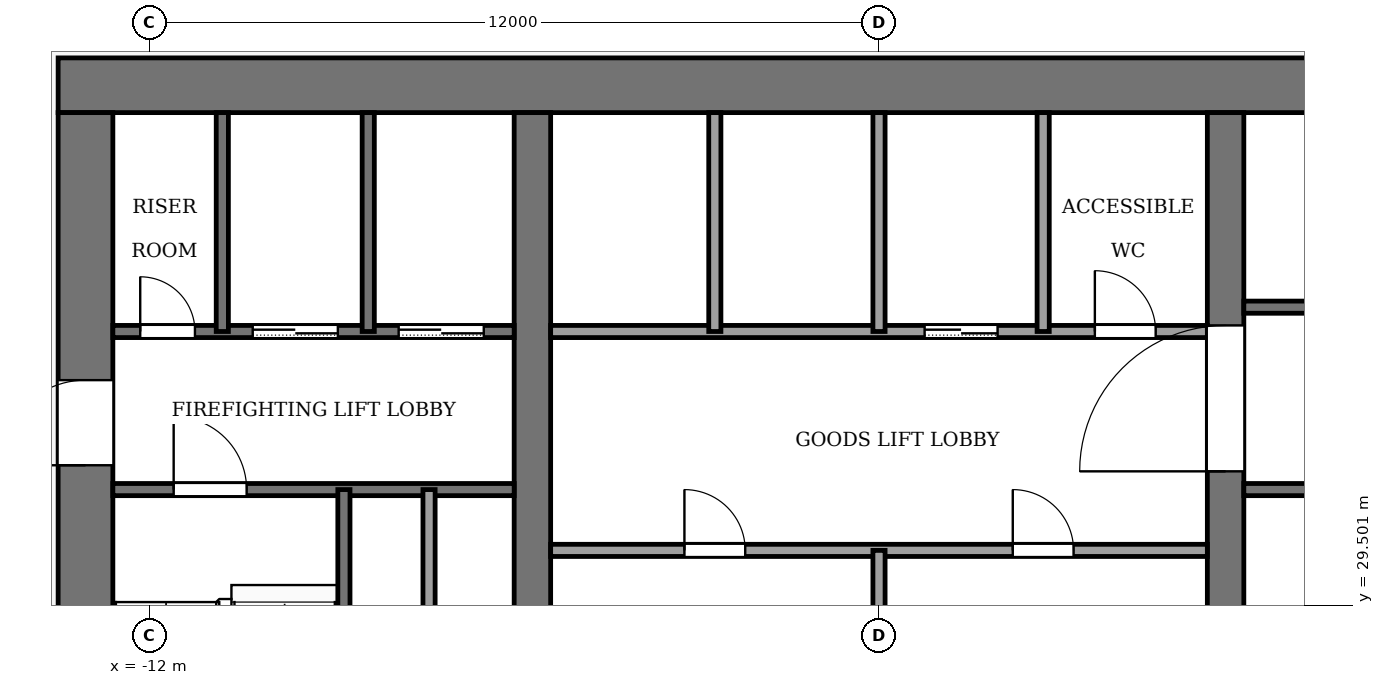
"""IFC4 building model, lengths in metres.
Left out: names, types, materials, properties, quantities, classifications, styles, units other than length and angle.
Written with IfcOpenShell. Run it as: python <this file> out.ifc"""

import sys

from ifc_helpers import new_model, si_unit, direction, frame, frame_2d, origin, place, context, subcontext, project, spatial, rectangle, extrude, element, fill, save


model = new_model("IFC4")
c1 = context("Model", 3, precision=1e-05, world=origin(), true_north=direction((0.0, 1.0)))
c2 = subcontext(c1, "Body", "Model", "MODEL_VIEW")
j1 = project(units=[si_unit("LENGTHUNIT", "METRE"), si_unit("PLANEANGLEUNIT", "RADIAN")], contexts=[c1])
p1 = place(None, origin())
s1 = spatial("IfcSite", under=j1, at=p1, CompositionType="ELEMENT")
p2 = place(p1, origin())
s2 = spatial("IfcBuilding", under=s1, at=p2, CompositionType="ELEMENT")
p3 = place(p2, frame((0.0, 0.0, 218.0)))
s3 = spatial("IfcBuildingStorey", under=s2, at=p3, CompositionType="ELEMENT", Elevation=218.0)
p4 = place(p3, frame((-13.5, 38.05, -0.13), z_axis=(0.0, 0.0, 1.0), x_axis=(1.0, 0.0, 0.0)))
e1 = element("IfcWall", 1, at=p4, inside=s3, PredefinedType="SHEAR", context=c2, shape_type="SweptSolid", body=[
    extrude(rectangle(XDim=27.0, YDim=0.9, at=frame_2d((13.5, 0.0))), origin(), (0.0, 0.0, 1.0), 4.0),
])
p5 = place(p3, frame((-13.05, 18.4, -0.13), z_axis=(0.0, 0.0, 1.0), x_axis=(0.0, 1.0, 0.0)))
e2 = element("IfcWall", 2, at=p5, inside=s3, PredefinedType="SHEAR", context=c2, shape_type="SweptSolid", body=[
    extrude(rectangle(XDim=19.2, YDim=0.9, at=frame_2d((9.6, 0.0))), origin(), (0.0, 0.0, 1.0), 4.0),
])
p6 = place(p5, frame((2.8, 0.0, 0.13)))
e3 = element("IfcOpeningElement", 3, at=p6, cuts=e2, PredefinedType="OPENING", context=c2, shape_type="SweptSolid", body=[
    extrude(rectangle(XDim=2.4, YDim=2.4, at=frame_2d((1.2, 1.2))), frame((0.0, 0.46, 0.0), z_axis=(0.0, -1.0, 0.0), x_axis=(1.0, 0.0, 0.0)), (0.0, 0.0, 1.0), 0.92),
])
p7 = place(p5, frame((13.4, 0.0, 0.13)))
e4 = element("IfcOpeningElement", 4, at=p7, cuts=e2, PredefinedType="OPENING", context=c2, shape_type="SweptSolid", body=[
    extrude(rectangle(XDim=1.4, YDim=2.2, at=frame_2d((0.7, 1.1))), frame((0.0, 0.46, 0.0), z_axis=(0.0, -1.0, 0.0), x_axis=(1.0, 0.0, 0.0)), (0.0, 0.0, 1.0), 0.92),
])
p8 = place(p3, frame((-5.7, 18.4, -0.13), z_axis=(0.0, 0.0, 1.0), x_axis=(0.0, 1.0, 0.0)))
e5 = element("IfcWall", 5, at=p8, inside=s3, PredefinedType="SHEAR", context=c2, shape_type="SweptSolid", body=[
    extrude(rectangle(XDim=19.2, YDim=0.6, at=frame_2d((9.6, 0.0))), origin(), (0.0, 0.0, 1.0), 4.0),
])
p9 = place(p8, frame((8.35, 0.0, 0.13)))
e6 = element("IfcOpeningElement", 6, at=p9, cuts=e5, PredefinedType="OPENING", context=c2, shape_type="SweptSolid", body=[
    extrude(rectangle(XDim=0.9, YDim=2.1, at=frame_2d((0.45, 1.05))), frame((0.0, 0.31, 0.0), z_axis=(0.0, -1.0, 0.0), x_axis=(1.0, 0.0, 0.0)), (0.0, 0.0, 1.0), 0.62),
])
p10 = place(p3, frame((5.7, 18.4, -0.13), z_axis=(0.0, 0.0, 1.0), x_axis=(0.0, 1.0, 0.0)))
e7 = element("IfcWall", 7, at=p10, inside=s3, PredefinedType="SHEAR", context=c2, shape_type="SweptSolid", body=[
    extrude(rectangle(XDim=19.2, YDim=0.6, at=frame_2d((9.6, 0.0))), origin(), (0.0, 0.0, 1.0), 4.0),
])
p11 = place(p10, frame((8.35, 0.0, 0.13)))
e8 = element("IfcOpeningElement", 8, at=p11, cuts=e7, PredefinedType="OPENING", context=c2, shape_type="SweptSolid", body=[
    extrude(rectangle(XDim=0.9, YDim=2.1, at=frame_2d((0.45, 1.05))), frame((0.0, 0.31, 0.0), z_axis=(0.0, -1.0, 0.0), x_axis=(1.0, 0.0, 0.0)), (0.0, 0.0, 1.0), 0.62),
])
p12 = place(p10, frame((13.3, 0.0, 0.13)))
e9 = element("IfcOpeningElement", 9, at=p12, cuts=e7, PredefinedType="OPENING", context=c2, shape_type="SweptSolid", body=[
    extrude(rectangle(XDim=2.4, YDim=2.4, at=frame_2d((1.2, 1.2))), frame((0.0, 0.31, 0.0), z_axis=(0.0, -1.0, 0.0), x_axis=(1.0, 0.0, 0.0)), (0.0, 0.0, 1.0), 0.62),
])
p13 = place(p3, frame((-5.4, 30.4, 0.0), z_axis=(0.0, 0.0, 1.0), x_axis=(1.0, 0.0, 0.0)))
e10 = element("IfcWall", 10, at=p13, inside=s3, PredefinedType="PARTITIONING", context=c2, shape_type="SweptSolid", body=[
    extrude(rectangle(XDim=10.8, YDim=0.2, at=frame_2d((5.4, 0.0))), origin(), (0.0, 0.0, 1.0), 3.87),
])
p14 = place(p13, frame((2.2, 0.0, 0.0)))
e11 = element("IfcOpeningElement", 11, at=p14, cuts=e10, PredefinedType="OPENING", context=c2, shape_type="SweptSolid", body=[
    extrude(rectangle(XDim=1.0, YDim=2.1, at=frame_2d((0.5, 1.05))), frame((0.0, 0.11, 0.0), z_axis=(0.0, -1.0, 0.0), x_axis=(1.0, 0.0, 0.0)), (0.0, 0.0, 1.0), 0.22),
])
p15 = place(p13, frame((7.6, 0.0, 0.0)))
e12 = element("IfcOpeningElement", 12, at=p15, cuts=e10, PredefinedType="OPENING", context=c2, shape_type="SweptSolid", body=[
    extrude(rectangle(XDim=1.0, YDim=2.1, at=frame_2d((0.5, 1.05))), frame((0.0, 0.11, 0.0), z_axis=(0.0, -1.0, 0.0), x_axis=(1.0, 0.0, 0.0)), (0.0, 0.0, 1.0), 0.22),
])
p16 = place(p3, frame((-12.6, 31.4, 0.0), z_axis=(0.0, 0.0, 1.0), x_axis=(1.0, 0.0, 0.0)))
e13 = element("IfcWall", 13, at=p16, inside=s3, PredefinedType="PARTITIONING", context=c2, shape_type="SweptSolid", body=[
    extrude(rectangle(XDim=6.6, YDim=0.2, at=frame_2d((3.3, 0.0))), origin(), (0.0, 0.0, 1.0), 3.87),
])
p17 = place(p16, frame((1.0, 0.0, 0.0)))
e14 = element("IfcOpeningElement", 14, at=p17, cuts=e13, PredefinedType="OPENING", context=c2, shape_type="SweptSolid", body=[
    extrude(rectangle(XDim=1.2, YDim=2.2, at=frame_2d((0.6, 1.1))), frame((0.0, 0.11, 0.0), z_axis=(0.0, -1.0, 0.0), x_axis=(1.0, 0.0, 0.0)), (0.0, 0.0, 1.0), 0.22),
])
p18 = place(p3, frame((6.0, 31.4, 0.0), z_axis=(0.0, 0.0, 1.0), x_axis=(1.0, 0.0, 0.0)))
e15 = element("IfcWall", 15, at=p18, inside=s3, PredefinedType="PARTITIONING", context=c2, shape_type="SweptSolid", body=[
    extrude(rectangle(XDim=6.6, YDim=0.2, at=frame_2d((3.3, 0.0))), origin(), (0.0, 0.0, 1.0), 3.87),
])
p19 = place(p3, frame((-12.6, 34.0, 0.0), z_axis=(0.0, 0.0, 1.0), x_axis=(1.0, 0.0, 0.0)))
e16 = element("IfcWall", 16, at=p19, inside=s3, PredefinedType="PARTITIONING", context=c2, shape_type="SweptSolid", body=[
    extrude(rectangle(XDim=6.6, YDim=0.2, at=frame_2d((3.3, 0.0))), origin(), (0.0, 0.0, 1.0), 3.87),
])
p20 = place(p19, frame((4.7, 0.0, 0.0)))
e17 = element("IfcOpeningElement", 17, at=p20, cuts=e16, PredefinedType="OPENING", context=c2, shape_type="SweptSolid", body=[
    extrude(rectangle(XDim=1.4, YDim=2.2, at=frame_2d((0.7, 1.1))), frame((0.0, 0.11, 0.0), z_axis=(0.0, -1.0, 0.0), x_axis=(1.0, 0.0, 0.0)), (0.0, 0.0, 1.0), 0.22),
])
p21 = place(p19, frame((2.3, 0.0, 0.0)))
e18 = element("IfcOpeningElement", 18, at=p21, cuts=e16, PredefinedType="OPENING", context=c2, shape_type="SweptSolid", body=[
    extrude(rectangle(XDim=1.4, YDim=2.2, at=frame_2d((0.7, 1.1))), frame((0.0, 0.11, 0.0), z_axis=(0.0, -1.0, 0.0), x_axis=(1.0, 0.0, 0.0)), (0.0, 0.0, 1.0), 0.22),
])
p22 = place(p19, frame((0.45, 0.0, 0.0)))
e19 = element("IfcOpeningElement", 19, at=p22, cuts=e16, PredefinedType="OPENING", context=c2, shape_type="SweptSolid", body=[
    extrude(rectangle(XDim=0.9, YDim=2.1, at=frame_2d((0.45, 1.05))), frame((0.0, 0.11, 0.0), z_axis=(0.0, -1.0, 0.0), x_axis=(1.0, 0.0, 0.0)), (0.0, 0.0, 1.0), 0.22),
])
p23 = place(p3, frame((-5.4, 34.0, 0.0), z_axis=(0.0, 0.0, 1.0), x_axis=(1.0, 0.0, 0.0)))
e20 = element("IfcWall", 20, at=p23, inside=s3, PredefinedType="PARTITIONING", context=c2, shape_type="SweptSolid", body=[
    extrude(rectangle(XDim=10.8, YDim=0.2, at=frame_2d((5.4, 0.0))), origin(), (0.0, 0.0, 1.0), 3.87),
])
p24 = place(p23, frame((6.15, 0.0, 0.0)))
e21 = element("IfcOpeningElement", 21, at=p24, cuts=e20, PredefinedType="OPENING", context=c2, shape_type="SweptSolid", body=[
    extrude(rectangle(XDim=1.2, YDim=2.2, at=frame_2d((0.6, 1.1))), frame((0.0, 0.11, 0.0), z_axis=(0.0, -1.0, 0.0), x_axis=(1.0, 0.0, 0.0)), (0.0, 0.0, 1.0), 0.22),
])
p25 = place(p23, frame((8.95, 0.0, 0.0)))
e22 = element("IfcOpeningElement", 22, at=p25, cuts=e20, PredefinedType="OPENING", context=c2, shape_type="SweptSolid", body=[
    extrude(rectangle(XDim=1.0, YDim=2.1, at=frame_2d((0.5, 1.05))), frame((0.0, 0.11, 0.0), z_axis=(0.0, -1.0, 0.0), x_axis=(1.0, 0.0, 0.0)), (0.0, 0.0, 1.0), 0.22),
])
p26 = place(p3, frame((6.0, 34.4, 0.0), z_axis=(0.0, 0.0, 1.0), x_axis=(1.0, 0.0, 0.0)))
e23 = element("IfcWall", 23, at=p26, inside=s3, PredefinedType="PARTITIONING", context=c2, shape_type="SweptSolid", body=[
    extrude(rectangle(XDim=6.6, YDim=0.2, at=frame_2d((3.3, 0.0))), origin(), (0.0, 0.0, 1.0), 3.87),
])
p27 = place(p26, frame((4.8, 0.0, 0.0)))
e24 = element("IfcOpeningElement", 24, at=p27, cuts=e23, PredefinedType="OPENING", context=c2, shape_type="SweptSolid", body=[
    extrude(rectangle(XDim=1.2, YDim=2.2, at=frame_2d((0.6, 1.1))), frame((0.0, 0.11, 0.0), z_axis=(0.0, -1.0, 0.0), x_axis=(1.0, 0.0, 0.0)), (0.0, 0.0, 1.0), 0.22),
])
p28 = place(p3, frame((-10.8, 34.0, 0.0), z_axis=(0.0, 0.0, 1.0), x_axis=(0.0, 1.0, 0.0)))
e25 = element("IfcWall", 25, at=p28, inside=s3, PredefinedType="PARTITIONING", context=c2, shape_type="SweptSolid", body=[
    extrude(rectangle(XDim=3.6, YDim=0.2, at=frame_2d((1.8, 0.0))), origin(), (0.0, 0.0, 1.0), 3.87),
])
p29 = place(p3, frame((-8.8, 24.0, 0.0), z_axis=(0.0, 0.0, 1.0), x_axis=(0.0, 1.0, 0.0)))
e26 = element("IfcWall", 26, at=p29, inside=s3, PredefinedType="PARTITIONING", context=c2, shape_type="SweptSolid", body=[
    extrude(rectangle(XDim=7.4, YDim=0.2, at=frame_2d((3.7, 0.0))), origin(), (0.0, 0.0, 1.0), 3.87),
])
p30 = place(p3, frame((-8.4, 34.0, 0.0), z_axis=(0.0, 0.0, 1.0), x_axis=(0.0, 1.0, 0.0)))
e27 = element("IfcWall", 27, at=p30, inside=s3, PredefinedType="PARTITIONING", context=c2, shape_type="SweptSolid", body=[
    extrude(rectangle(XDim=3.6, YDim=0.2, at=frame_2d((1.8, 0.0))), origin(), (0.0, 0.0, 1.0), 3.87),
])
p31 = place(p3, frame((-7.4, 24.0, 0.0), z_axis=(0.0, 0.0, 1.0), x_axis=(0.0, 1.0, 0.0)))
e28 = element("IfcWall", 28, at=p31, inside=s3, PredefinedType="PARTITIONING", context=c2, shape_type="SweptSolid", body=[
    extrude(rectangle(XDim=7.4, YDim=0.2, at=frame_2d((3.7, 0.0))), origin(), (0.0, 0.0, 1.0), 3.87),
])
p32 = place(p3, frame((-2.7, 34.0, 0.0), z_axis=(0.0, 0.0, 1.0), x_axis=(0.0, 1.0, 0.0)))
e29 = element("IfcWall", 29, at=p32, inside=s3, PredefinedType="PARTITIONING", context=c2, shape_type="SweptSolid", body=[
    extrude(rectangle(XDim=3.6, YDim=0.2, at=frame_2d((1.8, 0.0))), origin(), (0.0, 0.0, 1.0), 3.87),
])
p33 = place(p3, frame((0.0, 24.0, 0.0), z_axis=(0.0, 0.0, 1.0), x_axis=(0.0, 1.0, 0.0)))
e30 = element("IfcWall", 30, at=p33, inside=s3, PredefinedType="PARTITIONING", context=c2, shape_type="SweptSolid", body=[
    extrude(rectangle(XDim=6.4, YDim=0.2, at=frame_2d((3.2, 0.0))), origin(), (0.0, 0.0, 1.0), 3.87),
])
for number, where, z_axis, x_axis in (
    (31, (0.0, 34.0, 0.0), (0.0, 0.0, 1.0), (0.0, 1.0, 0.0)),
    (32, (2.7, 34.0, 0.0), (0.0, 0.0, 1.0), (0.0, 1.0, 0.0)),
):
    element("IfcWall", number, at=place(p3, frame(where, z_axis=z_axis, x_axis=x_axis)), inside=s3, PredefinedType="PARTITIONING", context=c2, shape_type="SweptSolid", body=[
        extrude(rectangle(XDim=3.6, YDim=0.2, at=frame_2d((1.8, 0.0))), origin(), (0.0, 0.0, 1.0), 3.87),
    ])
p34 = place(p24, origin())
e33 = element("IfcDoor", 33, at=p34, inside=s3, OperationType="SLIDING_TO_LEFT", PredefinedType="DOOR", context=c2, shape_type="SweptSolid", body=[
    extrude(rectangle(XDim=1.2, YDim=2.2, at=frame_2d((0.6, 1.1))), frame((0.0, 0.025, 0.0), z_axis=(0.0, -1.0, 0.0), x_axis=(1.0, 0.0, 0.0)), (0.0, 0.0, 1.0), 0.05),
])
fill(e21, e33)
p35 = place(p20, origin())
e34 = element("IfcDoor", 34, at=p35, inside=s3, OperationType="SLIDING_TO_LEFT", PredefinedType="DOOR", context=c2, shape_type="SweptSolid", body=[
    extrude(rectangle(XDim=1.4, YDim=2.2, at=frame_2d((0.7, 1.1))), frame((0.0, 0.025, 0.0), z_axis=(0.0, -1.0, 0.0), x_axis=(1.0, 0.0, 0.0)), (0.0, 0.0, 1.0), 0.05),
])
fill(e17, e34)
p36 = place(p21, origin())
e35 = element("IfcDoor", 35, at=p36, inside=s3, OperationType="SLIDING_TO_LEFT", PredefinedType="DOOR", context=c2, shape_type="SweptSolid", body=[
    extrude(rectangle(XDim=1.4, YDim=2.2, at=frame_2d((0.7, 1.1))), frame((0.0, 0.025, 0.0), z_axis=(0.0, -1.0, 0.0), x_axis=(1.0, 0.0, 0.0)), (0.0, 0.0, 1.0), 0.05),
])
fill(e18, e35)
p37 = place(p22, origin())
e36 = element("IfcDoor", 36, at=p37, inside=s3, OperationType="SINGLE_SWING_RIGHT", PredefinedType="DOOR", context=c2, shape_type="SweptSolid", body=[
    extrude(rectangle(XDim=0.9, YDim=2.1, at=frame_2d((0.45, 1.05))), frame((0.0, 0.025, 0.0), z_axis=(0.0, -1.0, 0.0), x_axis=(1.0, 0.0, 0.0)), (0.0, 0.0, 1.0), 0.05),
])
fill(e19, e36)
p38 = place(p14, origin())
e37 = element("IfcDoor", 37, at=p38, inside=s3, OperationType="SINGLE_SWING_LEFT", PredefinedType="DOOR", context=c2, shape_type="SweptSolid", body=[
    extrude(rectangle(XDim=1.0, YDim=2.1, at=frame_2d((0.5, 1.05))), frame((0.0, 0.025, 0.0), z_axis=(0.0, -1.0, 0.0), x_axis=(1.0, 0.0, 0.0)), (0.0, 0.0, 1.0), 0.05),
])
fill(e11, e37)
p39 = place(p15, origin())
e38 = element("IfcDoor", 38, at=p39, inside=s3, OperationType="SINGLE_SWING_RIGHT", PredefinedType="DOOR", context=c2, shape_type="SweptSolid", body=[
    extrude(rectangle(XDim=1.0, YDim=2.1, at=frame_2d((0.5, 1.05))), frame((0.0, 0.025, 0.0), z_axis=(0.0, -1.0, 0.0), x_axis=(1.0, 0.0, 0.0)), (0.0, 0.0, 1.0), 0.05),
])
fill(e12, e38)
p40 = place(p25, origin())
e39 = element("IfcDoor", 39, at=p40, inside=s3, OperationType="SINGLE_SWING_LEFT", PredefinedType="DOOR", context=c2, shape_type="SweptSolid", body=[
    extrude(rectangle(XDim=1.0, YDim=2.1, at=frame_2d((0.5, 1.05))), frame((0.0, 0.025, 0.0), z_axis=(0.0, -1.0, 0.0), x_axis=(1.0, 0.0, 0.0)), (0.0, 0.0, 1.0), 0.05),
])
fill(e22, e39)
p41 = place(p17, origin())
e40 = element("IfcDoor", 40, at=p41, inside=s3, OperationType="SINGLE_SWING_RIGHT", PredefinedType="DOOR", context=c2, shape_type="SweptSolid", body=[
    extrude(rectangle(XDim=1.2, YDim=2.2, at=frame_2d((0.6, 1.1))), frame((0.0, 0.025, 0.0), z_axis=(0.0, -1.0, 0.0), x_axis=(1.0, 0.0, 0.0)), (0.0, 0.0, 1.0), 0.05),
])
fill(e14, e40)
p42 = place(p12, origin())
e41 = element("IfcDoor", 41, at=p42, inside=s3, OperationType="DOUBLE_DOOR_SINGLE_SWING", PredefinedType="DOOR", context=c2, shape_type="SweptSolid", body=[
    extrude(rectangle(XDim=2.4, YDim=2.4, at=frame_2d((1.2, 1.2))), frame((0.0, 0.025, 0.0), z_axis=(0.0, -1.0, 0.0), x_axis=(1.0, 0.0, 0.0)), (0.0, 0.0, 1.0), 0.05),
])
fill(e9, e41)
p43 = place(p7, origin())
e42 = element("IfcDoor", 42, at=p43, inside=s3, OperationType="SINGLE_SWING_RIGHT", PredefinedType="DOOR", context=c2, shape_type="SweptSolid", body=[
    extrude(rectangle(XDim=1.4, YDim=2.2, at=frame_2d((0.7, 1.1))), frame((0.0, 0.025, 0.0), z_axis=(0.0, -1.0, 0.0), x_axis=(1.0, 0.0, 0.0)), (0.0, 0.0, 1.0), 0.05),
])
fill(e4, e42)
save(model, sys.argv[1])
